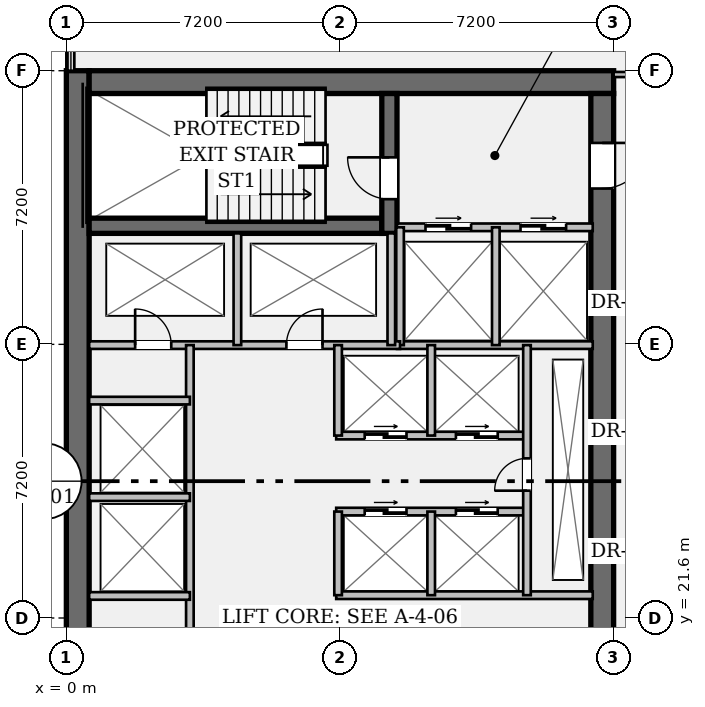
"""IFC4 building model, lengths in metres.
Left out: names, types, materials, properties, quantities, classifications, styles, units other than length and angle.
Written with IfcOpenShell. Run it as: python <this file> out.ifc"""

import sys

from ifc_helpers import new_model, si_unit, direction, frame, frame_2d, origin, place, context, subcontext, project, spatial, rectangle, extrude, element, fill, save


model = new_model("IFC4")
c1 = context("Model", 3, precision=1e-05, world=origin(), true_north=direction((0.0, 1.0)))
c2 = subcontext(c1, "Body", "Model", "MODEL_VIEW")
j1 = project(units=[si_unit("LENGTHUNIT", "METRE"), si_unit("PLANEANGLEUNIT", "RADIAN")], contexts=[c1])
p1 = place(None, origin())
s1 = spatial("IfcSite", under=j1, at=p1, CompositionType="ELEMENT")
p2 = place(p1, origin())
s2 = spatial("IfcBuilding", under=s1, at=p2, CompositionType="ELEMENT")
p3 = place(p2, frame((0.0, 0.0, 97.65)))
s3 = spatial("IfcBuildingStorey", under=s2, at=p3, CompositionType="ELEMENT", Elevation=97.65)
p4 = place(p3, frame((0.3, 7.2, 0.0), z_axis=(0.0, 0.0, 1.0), x_axis=(0.0, 1.0, 0.0)))
e1 = element("IfcWall", 1, at=p4, inside=s3, PredefinedType="SHEAR", context=c2, shape_type="SweptSolid", body=[
    extrude(rectangle(XDim=28.8, YDim=0.6, at=frame_2d((14.4, 0.0))), origin(), (0.0, 0.0, 1.0), 4.28),
])
p5 = place(p3, frame((0.6, 35.7, 0.0), z_axis=(0.0, 0.0, 1.0), x_axis=(1.0, 0.0, 0.0)))
e2 = element("IfcWall", 2, at=p5, inside=s3, PredefinedType="SHEAR", context=c2, shape_type="SweptSolid", body=[
    extrude(rectangle(XDim=13.8, YDim=0.6, at=frame_2d((6.9, 0.0))), origin(), (0.0, 0.0, 1.0), 4.28),
])
p6 = place(p3, frame((14.1, 35.4, 0.0), z_axis=(0.0, 0.0, 1.0), x_axis=(0.0, -1.0, 0.0)))
e3 = element("IfcWall", 3, at=p6, inside=s3, PredefinedType="SHEAR", context=c2, shape_type="SweptSolid", body=[
    extrude(rectangle(XDim=27.6, YDim=0.6, at=frame_2d((13.8, 0.0))), origin(), (0.0, 0.0, 1.0), 4.28),
])
p7 = place(p6, frame((1.3, 0.0, 0.0)))
e4 = element("IfcOpeningElement", 4, at=p7, cuts=e3, PredefinedType="OPENING", context=c2, shape_type="SweptSolid", body=[
    extrude(rectangle(XDim=1.2, YDim=2.15, at=frame_2d((0.6, 1.075))), frame((0.0, 0.312, 0.0), z_axis=(0.0, -1.0, 0.0), x_axis=(1.0, 0.0, 0.0)), (0.0, 0.0, 1.0), 0.624),
])
p8 = place(p6, frame((25.25, 0.0, 0.0)))
e5 = element("IfcOpeningElement", 5, at=p8, cuts=e3, PredefinedType="OPENING", context=c2, shape_type="SweptSolid", body=[
    extrude(rectangle(XDim=1.2, YDim=2.15, at=frame_2d((0.6, 1.075))), frame((0.0, 0.312, 0.0), z_axis=(0.0, -1.0, 0.0), x_axis=(1.0, 0.0, 0.0)), (0.0, 0.0, 1.0), 0.624),
])
p9 = place(p6, frame((14.6, 0.0, 0.0)))
e6 = element("IfcOpeningElement", 6, at=p9, cuts=e3, PredefinedType="OPENING", context=c2, shape_type="SweptSolid", body=[
    extrude(rectangle(XDim=1.6, YDim=2.2, at=frame_2d((0.8, 1.1))), frame((0.0, 0.312, 0.0), z_axis=(0.0, -1.0, 0.0), x_axis=(1.0, 0.0, 0.0)), (0.0, 0.0, 1.0), 0.624),
])
p10 = place(p3, frame((0.6, 31.92, 0.0), z_axis=(0.0, 0.0, 1.0), x_axis=(1.0, 0.0, 0.0)))
e7 = element("IfcWall", 7, at=p10, inside=s3, PredefinedType="SHEAR", context=c2, shape_type="SweptSolid", body=[
    extrude(rectangle(XDim=7.7, YDim=0.4, at=frame_2d((3.85, 0.0))), origin(), (0.0, 0.0, 1.0), 4.28),
])
p11 = place(p3, frame((8.5, 31.72, 0.0), z_axis=(0.0, 0.0, 1.0), x_axis=(0.0, 1.0, 0.0)))
e8 = element("IfcWall", 8, at=p11, inside=s3, PredefinedType="SHEAR", context=c2, shape_type="SweptSolid", body=[
    extrude(rectangle(XDim=3.68, YDim=0.4, at=frame_2d((1.84, 0.0))), origin(), (0.0, 0.0, 1.0), 4.28),
])
p12 = place(p11, frame((0.9, 0.0, 0.0)))
e9 = element("IfcOpeningElement", 9, at=p12, cuts=e8, PredefinedType="OPENING", context=c2, shape_type="SweptSolid", body=[
    extrude(rectangle(XDim=1.1, YDim=2.15, at=frame_2d((0.55, 1.075))), frame((0.0, 0.212, 0.0), z_axis=(0.0, -1.0, 0.0), x_axis=(1.0, 0.0, 0.0)), (0.0, 0.0, 1.0), 0.424),
])
p13 = place(p3, frame((8.7, 31.88, 0.0), z_axis=(0.0, 0.0, 1.0), x_axis=(1.0, 0.0, 0.0)))
e10 = element("IfcWall", 10, at=p13, inside=s3, PredefinedType="PARTITIONING", context=c2, shape_type="SweptSolid", body=[
    extrude(rectangle(XDim=5.15, YDim=0.2, at=frame_2d((2.575, 0.0))), origin(), (0.0, 0.0, 1.0), 4.28),
])
p14 = place(p13, frame((0.75, 0.0, 0.0)))
e11 = element("IfcOpeningElement", 11, at=p14, cuts=e10, PredefinedType="OPENING", context=c2, shape_type="SweptSolid", body=[
    extrude(rectangle(XDim=1.2, YDim=2.2, at=frame_2d((0.6, 1.1))), frame((0.0, 0.112, 0.0), z_axis=(0.0, -1.0, 0.0), x_axis=(1.0, 0.0, 0.0)), (0.0, 0.0, 1.0), 0.224),
])
p15 = place(p13, frame((3.25, 0.0, 0.0)))
e12 = element("IfcOpeningElement", 12, at=p15, cuts=e10, PredefinedType="OPENING", context=c2, shape_type="SweptSolid", body=[
    extrude(rectangle(XDim=1.2, YDim=2.2, at=frame_2d((0.6, 1.1))), frame((0.0, 0.112, 0.0), z_axis=(0.0, -1.0, 0.0), x_axis=(1.0, 0.0, 0.0)), (0.0, 0.0, 1.0), 0.224),
])
p16 = place(p3, frame((8.7, 28.78, 0.0), z_axis=(0.0, 0.0, 1.0), x_axis=(1.0, 0.0, 0.0)))
e13 = element("IfcWall", 13, at=p16, inside=s3, PredefinedType="PARTITIONING", context=c2, shape_type="SweptSolid", body=[
    extrude(rectangle(XDim=5.15, YDim=0.2, at=frame_2d((2.575, 0.0))), origin(), (0.0, 0.0, 1.0), 4.28),
])
for number, where, z_axis, x_axis in (
    (14, (8.78, 28.78, 0.0), (0.0, 0.0, 1.0), (0.0, 1.0, 0.0)),
    (15, (11.3, 28.78, 0.0), (0.0, 0.0, 1.0), (0.0, 1.0, 0.0)),
):
    element("IfcWall", number, at=place(p3, frame(where, z_axis=z_axis, x_axis=x_axis)), inside=s3, PredefinedType="PARTITIONING", context=c2, shape_type="SweptSolid", body=[
        extrude(rectangle(XDim=3.1, YDim=0.2, at=frame_2d((1.55, 0.0))), origin(), (0.0, 0.0, 1.0), 4.28),
    ])
p17 = place(p3, frame((0.6, 28.78, 0.0), z_axis=(0.0, 0.0, 1.0), x_axis=(1.0, 0.0, 0.0)))
e16 = element("IfcWall", 16, at=p17, inside=s3, PredefinedType="PARTITIONING", context=c2, shape_type="SweptSolid", body=[
    extrude(rectangle(XDim=8.18, YDim=0.2, at=frame_2d((4.09, 0.0))), origin(), (0.0, 0.0, 1.0), 4.28),
])
p18 = place(p17, frame((1.21, 0.0, 0.0)))
e17 = element("IfcOpeningElement", 17, at=p18, cuts=e16, PredefinedType="OPENING", context=c2, shape_type="SweptSolid", body=[
    extrude(rectangle(XDim=0.95, YDim=2.15, at=frame_2d((0.475, 1.075))), frame((0.0, 0.112, 0.0), z_axis=(0.0, -1.0, 0.0), x_axis=(1.0, 0.0, 0.0)), (0.0, 0.0, 1.0), 0.224),
])
p19 = place(p17, frame((5.19, 0.0, 0.0)))
e18 = element("IfcOpeningElement", 18, at=p19, cuts=e16, PredefinedType="OPENING", context=c2, shape_type="SweptSolid", body=[
    extrude(rectangle(XDim=0.95, YDim=2.15, at=frame_2d((0.475, 1.075))), frame((0.0, 0.112, 0.0), z_axis=(0.0, -1.0, 0.0), x_axis=(1.0, 0.0, 0.0)), (0.0, 0.0, 1.0), 0.224),
])
for number, where, z_axis, x_axis in (
    (19, (4.5, 28.78, 0.0), (0.0, 0.0, 1.0), (0.0, 1.0, 0.0)),
    (20, (8.55, 28.78, 0.0), (0.0, 0.0, 1.0), (0.0, 1.0, 0.0)),
):
    element("IfcWall", number, at=place(p3, frame(where, z_axis=z_axis, x_axis=x_axis)), inside=s3, PredefinedType="PARTITIONING", context=c2, shape_type="SweptSolid", body=[
        extrude(rectangle(XDim=2.94, YDim=0.2, at=frame_2d((1.47, 0.0))), origin(), (0.0, 0.0, 1.0), 4.28),
    ])
p20 = place(p3, frame((3.25, 15.7, 0.0), z_axis=(0.0, 0.0, 1.0), x_axis=(0.0, 1.0, 0.0)))
e21 = element("IfcWall", 21, at=p20, inside=s3, PredefinedType="PARTITIONING", context=c2, shape_type="SweptSolid", body=[
    extrude(rectangle(XDim=13.08, YDim=0.2, at=frame_2d((6.54, 0.0))), origin(), (0.0, 0.0, 1.0), 4.28),
])
for number, where, z_axis, x_axis in (
    (22, (0.6, 22.18, 0.0), (0.0, 0.0, 1.0), (1.0, 0.0, 0.0)),
    (23, (0.6, 24.78, 0.0), (0.0, 0.0, 1.0), (1.0, 0.0, 0.0)),
    (24, (0.6, 27.32, 0.0), (0.0, 0.0, 1.0), (1.0, 0.0, 0.0)),
):
    element("IfcWall", number, at=place(p3, frame(where, z_axis=z_axis, x_axis=x_axis)), inside=s3, PredefinedType="PARTITIONING", context=c2, shape_type="SweptSolid", body=[
        extrude(rectangle(XDim=2.65, YDim=0.2, at=frame_2d((1.325, 0.0))), origin(), (0.0, 0.0, 1.0), 4.28),
    ])
p21 = place(p3, frame((7.1, 22.2, 0.0), z_axis=(0.0, 0.0, 1.0), x_axis=(1.0, 0.0, 0.0)))
e25 = element("IfcWall", 25, at=p21, inside=s3, PredefinedType="PARTITIONING", context=c2, shape_type="SweptSolid", body=[
    extrude(rectangle(XDim=6.75, YDim=0.2, at=frame_2d((3.375, 0.0))), origin(), (0.0, 0.0, 1.0), 4.28),
])
p22 = place(p3, frame((7.1, 24.4, 0.0), z_axis=(0.0, 0.0, 1.0), x_axis=(1.0, 0.0, 0.0)))
e26 = element("IfcWall", 26, at=p22, inside=s3, PredefinedType="PARTITIONING", context=c2, shape_type="SweptSolid", body=[
    extrude(rectangle(XDim=5.02, YDim=0.2, at=frame_2d((2.51, 0.0))), origin(), (0.0, 0.0, 1.0), 4.28),
])
p23 = place(p22, frame((0.75, 0.0, 0.0)))
e27 = element("IfcOpeningElement", 27, at=p23, cuts=e26, PredefinedType="OPENING", context=c2, shape_type="SweptSolid", body=[
    extrude(rectangle(XDim=1.1, YDim=2.2, at=frame_2d((0.55, 1.1))), frame((0.0, 0.112, 0.0), z_axis=(0.0, -1.0, 0.0), x_axis=(1.0, 0.0, 0.0)), (0.0, 0.0, 1.0), 0.224),
])
p24 = place(p22, frame((3.15, 0.0, 0.0)))
e28 = element("IfcOpeningElement", 28, at=p24, cuts=e26, PredefinedType="OPENING", context=c2, shape_type="SweptSolid", body=[
    extrude(rectangle(XDim=1.1, YDim=2.2, at=frame_2d((0.55, 1.1))), frame((0.0, 0.112, 0.0), z_axis=(0.0, -1.0, 0.0), x_axis=(1.0, 0.0, 0.0)), (0.0, 0.0, 1.0), 0.224),
])
p25 = place(p3, frame((7.1, 26.4, 0.0), z_axis=(0.0, 0.0, 1.0), x_axis=(1.0, 0.0, 0.0)))
e29 = element("IfcWall", 29, at=p25, inside=s3, PredefinedType="PARTITIONING", context=c2, shape_type="SweptSolid", body=[
    extrude(rectangle(XDim=5.02, YDim=0.2, at=frame_2d((2.51, 0.0))), origin(), (0.0, 0.0, 1.0), 4.28),
])
p26 = place(p25, frame((0.75, 0.0, 0.0)))
e30 = element("IfcOpeningElement", 30, at=p26, cuts=e29, PredefinedType="OPENING", context=c2, shape_type="SweptSolid", body=[
    extrude(rectangle(XDim=1.1, YDim=2.2, at=frame_2d((0.55, 1.1))), frame((0.0, 0.112, 0.0), z_axis=(0.0, -1.0, 0.0), x_axis=(1.0, 0.0, 0.0)), (0.0, 0.0, 1.0), 0.224),
])
p27 = place(p25, frame((3.15, 0.0, 0.0)))
e31 = element("IfcOpeningElement", 31, at=p27, cuts=e29, PredefinedType="OPENING", context=c2, shape_type="SweptSolid", body=[
    extrude(rectangle(XDim=1.1, YDim=2.2, at=frame_2d((0.55, 1.1))), frame((0.0, 0.112, 0.0), z_axis=(0.0, -1.0, 0.0), x_axis=(1.0, 0.0, 0.0)), (0.0, 0.0, 1.0), 0.224),
])
p28 = place(p3, frame((7.15, 22.2, 0.0), z_axis=(0.0, 0.0, 1.0), x_axis=(0.0, 1.0, 0.0)))
e32 = element("IfcWall", 32, at=p28, inside=s3, PredefinedType="PARTITIONING", context=c2, shape_type="SweptSolid", body=[
    extrude(rectangle(XDim=2.2, YDim=0.2, at=frame_2d((1.1, 0.0))), origin(), (0.0, 0.0, 1.0), 4.28),
])
p29 = place(p3, frame((7.15, 26.4, 0.0), z_axis=(0.0, 0.0, 1.0), x_axis=(0.0, 1.0, 0.0)))
e33 = element("IfcWall", 33, at=p29, inside=s3, PredefinedType="PARTITIONING", context=c2, shape_type="SweptSolid", body=[
    extrude(rectangle(XDim=2.38, YDim=0.2, at=frame_2d((1.19, 0.0))), origin(), (0.0, 0.0, 1.0), 4.28),
])
p30 = place(p3, frame((9.6, 22.2, 0.0), z_axis=(0.0, 0.0, 1.0), x_axis=(0.0, 1.0, 0.0)))
e34 = element("IfcWall", 34, at=p30, inside=s3, PredefinedType="PARTITIONING", context=c2, shape_type="SweptSolid", body=[
    extrude(rectangle(XDim=2.2, YDim=0.2, at=frame_2d((1.1, 0.0))), origin(), (0.0, 0.0, 1.0), 4.28),
])
p31 = place(p3, frame((9.6, 26.4, 0.0), z_axis=(0.0, 0.0, 1.0), x_axis=(0.0, 1.0, 0.0)))
e35 = element("IfcWall", 35, at=p31, inside=s3, PredefinedType="PARTITIONING", context=c2, shape_type="SweptSolid", body=[
    extrude(rectangle(XDim=2.38, YDim=0.2, at=frame_2d((1.19, 0.0))), origin(), (0.0, 0.0, 1.0), 4.28),
])
p32 = place(p3, frame((12.12, 22.2, 0.0), z_axis=(0.0, 0.0, 1.0), x_axis=(0.0, 1.0, 0.0)))
e36 = element("IfcWall", 36, at=p32, inside=s3, PredefinedType="PARTITIONING", context=c2, shape_type="SweptSolid", body=[
    extrude(rectangle(XDim=6.58, YDim=0.2, at=frame_2d((3.29, 0.0))), origin(), (0.0, 0.0, 1.0), 4.28),
])
p33 = place(p32, frame((2.75, 0.0, 0.0)))
e37 = element("IfcOpeningElement", 37, at=p33, cuts=e36, PredefinedType="OPENING", context=c2, shape_type="SweptSolid", body=[
    extrude(rectangle(XDim=0.85, YDim=2.15, at=frame_2d((0.425, 1.075))), frame((0.0, 0.112, 0.0), z_axis=(0.0, -1.0, 0.0), x_axis=(1.0, 0.0, 0.0)), (0.0, 0.0, 1.0), 0.224),
])
p34 = place(p3, frame((14.4, 35.9, 0.0), z_axis=(0.0, 0.0, 1.0), x_axis=(1.0, 0.0, 0.0)))
e38 = element("IfcWall", 38, at=p34, inside=s3, PredefinedType="PARTITIONING", context=c2, shape_type="SweptSolid", body=[
    extrude(rectangle(XDim=2.95, YDim=0.135, at=frame_2d((1.475, 0.0))), origin(), (0.0, 0.0, 1.0), 3.493),
])
p35 = place(p34, frame((0.95, 0.0, 0.0)))
e39 = element("IfcOpeningElement", 39, at=p35, cuts=e38, PredefinedType="OPENING", context=c2, shape_type="SweptSolid", body=[
    extrude(rectangle(XDim=1.0, YDim=2.15, at=frame_2d((0.5, 1.075))), frame((0.0, 0.08, 0.0), z_axis=(0.0, -1.0, 0.0), x_axis=(1.0, 0.0, 0.0)), (0.0, 0.0, 1.0), 0.159),
])
p36 = place(p12, origin())
e40 = element("IfcDoor", 40, at=p36, inside=s3, OperationType="SINGLE_SWING_RIGHT", PredefinedType="DOOR", context=c2, shape_type="SweptSolid", body=[
    extrude(rectangle(XDim=1.1, YDim=2.15, at=frame_2d((0.55, 1.075))), frame((0.0, 0.025, 0.0), z_axis=(0.0, -1.0, 0.0), x_axis=(1.0, 0.0, 0.0)), (0.0, 0.0, 1.0), 0.05),
])
fill(e9, e40)
p37 = place(p7, origin())
e41 = element("IfcDoor", 41, at=p37, inside=s3, OperationType="SINGLE_SWING_LEFT", PredefinedType="DOOR", context=c2, shape_type="SweptSolid", body=[
    extrude(rectangle(XDim=1.2, YDim=2.15, at=frame_2d((0.6, 1.075))), frame((0.0, 0.025, 0.0), z_axis=(0.0, -1.0, 0.0), x_axis=(1.0, 0.0, 0.0)), (0.0, 0.0, 1.0), 0.05),
])
fill(e4, e41)
p38 = place(p14, origin())
e42 = element("IfcDoor", 42, at=p38, inside=s3, OperationType="DOUBLE_DOOR_SLIDING", PredefinedType="DOOR", context=c2, shape_type="SweptSolid", body=[
    extrude(rectangle(XDim=1.2, YDim=2.2, at=frame_2d((0.6, 1.1))), frame((0.0, 0.025, 0.0), z_axis=(0.0, -1.0, 0.0), x_axis=(1.0, 0.0, 0.0)), (0.0, 0.0, 1.0), 0.05),
])
fill(e11, e42)
p39 = place(p15, origin())
e43 = element("IfcDoor", 43, at=p39, inside=s3, OperationType="DOUBLE_DOOR_SLIDING", PredefinedType="DOOR", context=c2, shape_type="SweptSolid", body=[
    extrude(rectangle(XDim=1.2, YDim=2.2, at=frame_2d((0.6, 1.1))), frame((0.0, 0.025, 0.0), z_axis=(0.0, -1.0, 0.0), x_axis=(1.0, 0.0, 0.0)), (0.0, 0.0, 1.0), 0.05),
])
fill(e12, e43)
p40 = place(p18, origin())
e44 = element("IfcDoor", 44, at=p40, inside=s3, OperationType="SINGLE_SWING_LEFT", PredefinedType="DOOR", context=c2, shape_type="SweptSolid", body=[
    extrude(rectangle(XDim=0.95, YDim=2.15, at=frame_2d((0.475, 1.075))), frame((0.0, 0.025, 0.0), z_axis=(0.0, -1.0, 0.0), x_axis=(1.0, 0.0, 0.0)), (0.0, 0.0, 1.0), 0.05),
])
fill(e17, e44)
p41 = place(p19, origin())
e45 = element("IfcDoor", 45, at=p41, inside=s3, OperationType="SINGLE_SWING_RIGHT", PredefinedType="DOOR", context=c2, shape_type="SweptSolid", body=[
    extrude(rectangle(XDim=0.95, YDim=2.15, at=frame_2d((0.475, 1.075))), frame((0.0, 0.025, 0.0), z_axis=(0.0, -1.0, 0.0), x_axis=(1.0, 0.0, 0.0)), (0.0, 0.0, 1.0), 0.05),
])
fill(e18, e45)
p42 = place(p33, origin())
e46 = element("IfcDoor", 46, at=p42, inside=s3, OperationType="SINGLE_SWING_LEFT", PredefinedType="DOOR", context=c2, shape_type="SweptSolid", body=[
    extrude(rectangle(XDim=0.85, YDim=2.15, at=frame_2d((0.425, 1.075))), frame((0.0, 0.025, 0.0), z_axis=(0.0, -1.0, 0.0), x_axis=(1.0, 0.0, 0.0)), (0.0, 0.0, 1.0), 0.05),
])
fill(e37, e46)
p43 = place(p23, origin())
e47 = element("IfcDoor", 47, at=p43, inside=s3, OperationType="DOUBLE_DOOR_SLIDING", PredefinedType="DOOR", context=c2, shape_type="SweptSolid", body=[
    extrude(rectangle(XDim=1.1, YDim=2.2, at=frame_2d((0.55, 1.1))), frame((0.0, 0.025, 0.0), z_axis=(0.0, -1.0, 0.0), x_axis=(1.0, 0.0, 0.0)), (0.0, 0.0, 1.0), 0.05),
])
fill(e27, e47)
p44 = place(p24, origin())
e48 = element("IfcDoor", 48, at=p44, inside=s3, OperationType="DOUBLE_DOOR_SLIDING", PredefinedType="DOOR", context=c2, shape_type="SweptSolid", body=[
    extrude(rectangle(XDim=1.1, YDim=2.2, at=frame_2d((0.55, 1.1))), frame((0.0, 0.025, 0.0), z_axis=(0.0, -1.0, 0.0), x_axis=(1.0, 0.0, 0.0)), (0.0, 0.0, 1.0), 0.05),
])
fill(e28, e48)
p45 = place(p26, origin())
e49 = element("IfcDoor", 49, at=p45, inside=s3, OperationType="DOUBLE_DOOR_SLIDING", PredefinedType="DOOR", context=c2, shape_type="SweptSolid", body=[
    extrude(rectangle(XDim=1.1, YDim=2.2, at=frame_2d((0.55, 1.1))), frame((0.0, 0.025, 0.0), z_axis=(0.0, -1.0, 0.0), x_axis=(1.0, 0.0, 0.0)), (0.0, 0.0, 1.0), 0.05),
])
fill(e30, e49)
p46 = place(p27, origin())
e50 = element("IfcDoor", 50, at=p46, inside=s3, OperationType="DOUBLE_DOOR_SLIDING", PredefinedType="DOOR", context=c2, shape_type="SweptSolid", body=[
    extrude(rectangle(XDim=1.1, YDim=2.2, at=frame_2d((0.55, 1.1))), frame((0.0, 0.025, 0.0), z_axis=(0.0, -1.0, 0.0), x_axis=(1.0, 0.0, 0.0)), (0.0, 0.0, 1.0), 0.05),
])
fill(e31, e50)
save(model, sys.argv[1])
